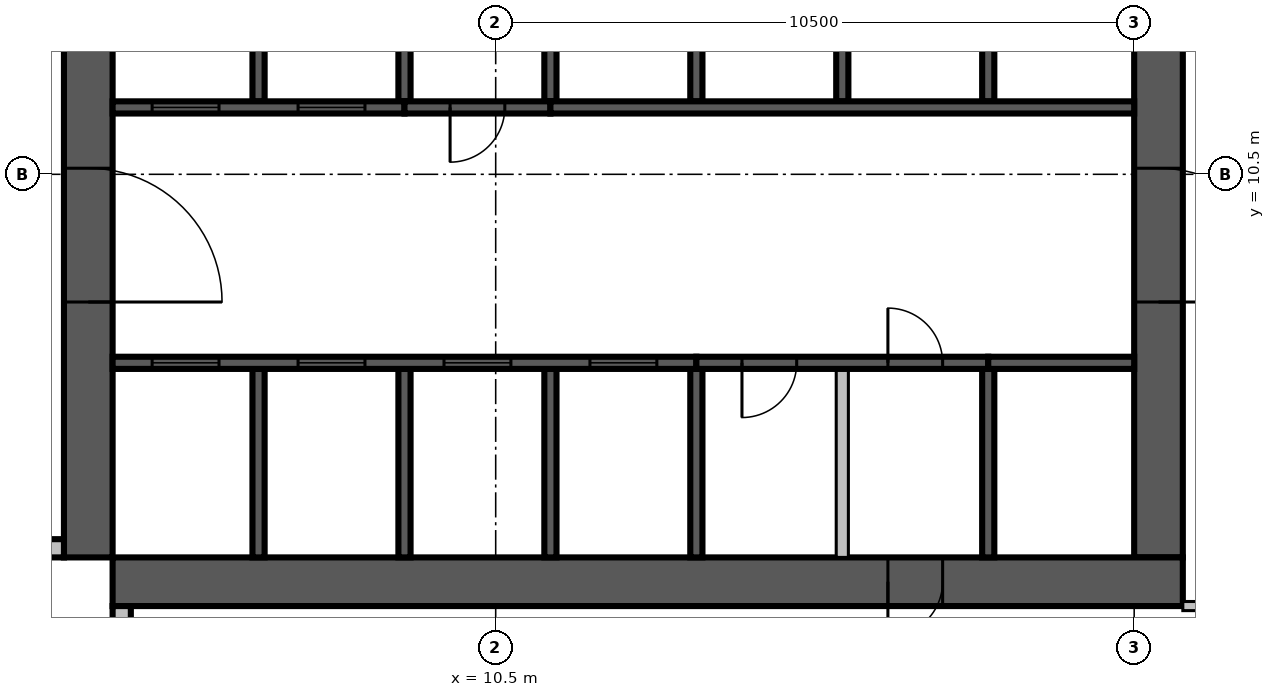
"""IFC4 building model, lengths in metres.
Left out: names, types, materials, properties, quantities, classifications, styles, units other than length and angle.
Written with IfcOpenShell. Run it as: python <this file> out.ifc"""

import sys

from ifc_helpers import new_model, si_unit, direction, frame, frame_2d, origin, place, context, subcontext, project, spatial, rectangle, extrude, source, transform, mapped, element, fill, save


model = new_model("IFC4")
c1 = context("Model", 3, precision=1e-05, world=origin(), true_north=direction((0.0, 1.0)))
c2 = subcontext(c1, "Body", "Model", "MODEL_VIEW")
j1 = project(units=[si_unit("LENGTHUNIT", "METRE"), si_unit("PLANEANGLEUNIT", "RADIAN")], contexts=[c1])
p1 = place(None, origin())
s1 = spatial("IfcSite", under=j1, at=p1, CompositionType="ELEMENT")
p2 = place(p1, origin())
s2 = spatial("IfcBuilding", under=s1, at=p2, CompositionType="ELEMENT")
p3 = place(p2, frame((0.0, 0.0, 193.0)))
s3 = spatial("IfcBuildingStorey", under=s2, at=p3, CompositionType="ELEMENT", Elevation=193.0)
m1 = source(origin(), c2, "Body", "SweptSolid", [
    extrude(rectangle(XDim=17.6, YDim=0.8, at=frame_2d((8.8, 0.0))), origin(), (0.0, 0.0, 1.0), 3.8),
])
p4 = place(p3, frame((3.8, 4.2, 0.0), z_axis=(0.0, 0.0, 1.0), x_axis=(0.0, 1.0, 0.0)))
e1 = element("IfcWall", 1, at=p4, inside=s3, PredefinedType="SHEAR", context=c2, shape_type="MappedRepresentation", body=[
    mapped(m1, transform((0.0, 0.0, 0.0), scale=1.0)),
])
m2 = source(origin(), c2, "Body", "SweptSolid", [
    extrude(rectangle(XDim=2.2, YDim=2.1, at=frame_2d((1.1, 1.05))), frame((0.0, 0.41, 0.0), z_axis=(0.0, -1.0, 0.0), x_axis=(1.0, 0.0, 0.0)), (0.0, 0.0, 1.0), 0.82),
])
p5 = place(p4, frame((4.2, 0.0, 0.0)))
e2 = element("IfcOpeningElement", 2, at=p5, cuts=e1, PredefinedType="OPENING", context=c2, shape_type="MappedRepresentation", body=[
    mapped(m2, transform((0.0, 0.0, 0.0), scale=1.0)),
])
m3 = source(origin(), c2, "Body", "SweptSolid", [
    extrude(rectangle(XDim=0.9, YDim=2.1, at=frame_2d((0.45, 1.05))), frame((0.0, 0.41, 0.0), z_axis=(0.0, -1.0, 0.0), x_axis=(1.0, 0.0, 0.0)), (0.0, 0.0, 1.0), 0.82),
])
p6 = place(p4, frame((10.95, 0.0, 0.0)))
e3 = element("IfcOpeningElement", 3, at=p6, cuts=e1, PredefinedType="OPENING", context=c2, shape_type="MappedRepresentation", body=[
    mapped(m3, transform((0.0, 0.0, 0.0), scale=1.0)),
])
m4 = source(origin(), c2, "Body", "SweptSolid", [
    extrude(rectangle(XDim=16.8, YDim=0.8, at=frame_2d((8.4, 0.0))), origin(), (0.0, 0.0, 1.0), 3.8),
])
p7 = place(p3, frame((21.4, 4.2, 0.0), z_axis=(0.0, 0.0, 1.0), x_axis=(0.0, 1.0, 0.0)))
e4 = element("IfcWall", 4, at=p7, inside=s3, PredefinedType="SHEAR", context=c2, shape_type="MappedRepresentation", body=[
    mapped(m4, transform((0.0, 0.0, 0.0), scale=1.0)),
])
p8 = place(p7, frame((4.2, 0.0, 0.0)))
e5 = element("IfcOpeningElement", 5, at=p8, cuts=e4, PredefinedType="OPENING", context=c2, shape_type="MappedRepresentation", body=[
    mapped(m2, transform((0.0, 0.0, 0.0), scale=1.0)),
])
m5 = source(origin(), c2, "Body", "SweptSolid", [
    extrude(rectangle(XDim=1.2, YDim=2.1, at=frame_2d((0.6, 1.05))), frame((0.0, 0.41, 0.0), z_axis=(0.0, -1.0, 0.0), x_axis=(1.0, 0.0, 0.0)), (0.0, 0.0, 1.0), 0.82),
])
p9 = place(p7, frame((14.7, 0.0, 0.0)))
e6 = element("IfcOpeningElement", 6, at=p9, cuts=e4, PredefinedType="OPENING", context=c2, shape_type="MappedRepresentation", body=[
    mapped(m5, transform((0.0, 0.0, 0.0), scale=1.0)),
])
p10 = place(p3, frame((4.2, 3.8, 0.0), z_axis=(0.0, 0.0, 1.0), x_axis=(1.0, 0.0, 0.0)))
e7 = element("IfcWall", 7, at=p10, inside=s3, PredefinedType="SHEAR", context=c2, shape_type="MappedRepresentation", body=[
    mapped(m1, transform((0.0, 0.0, 0.0), scale=1.0)),
])
p11 = place(p10, frame((12.75, 0.0, 0.0)))
e8 = element("IfcOpeningElement", 8, at=p11, cuts=e7, PredefinedType="OPENING", context=c2, shape_type="MappedRepresentation", body=[
    mapped(m3, transform((0.0, 0.0, 0.0), scale=1.0)),
])
m6 = source(origin(), c2, "Body", "SweptSolid", [
    extrude(rectangle(XDim=3.4, YDim=0.3, at=frame_2d((1.7, 0.0))), origin(), (0.0, 0.0, 1.0), 3.4),
])
p12 = place(p3, frame((0.0, 4.35, 0.0), z_axis=(0.0, 0.0, 1.0), x_axis=(1.0, 0.0, 0.0)))
e9 = element("IfcWall", 9, at=p12, inside=s3, PredefinedType="STANDARD", context=c2, shape_type="MappedRepresentation", body=[
    mapped(m6, transform((0.0, 0.0, 0.0), scale=1.0)),
])
m7 = source(origin(), c2, "Body", "SweptSolid", [
    extrude(rectangle(XDim=1.8, YDim=2.3, at=frame_2d((0.9, 1.15))), frame((0.0, 0.16, 0.0), z_axis=(0.0, -1.0, 0.0), x_axis=(1.0, 0.0, 0.0)), (0.0, 0.0, 1.0), 0.32),
])
p13 = place(p12, frame((1.2, 0.0, 0.6)))
e10 = element("IfcOpeningElement", 10, at=p13, cuts=e9, PredefinedType="OPENING", context=c2, shape_type="MappedRepresentation", body=[
    mapped(m7, transform((0.0, 0.0, 0.0), scale=1.0)),
])
p14 = place(p3, frame((4.35, 3.4, 0.0), z_axis=(0.0, 0.0, 1.0), x_axis=(0.0, -1.0, 0.0)))
e11 = element("IfcWall", 11, at=p14, inside=s3, PredefinedType="STANDARD", context=c2, shape_type="MappedRepresentation", body=[
    mapped(m6, transform((0.0, 0.0, 0.0), scale=1.0)),
])
p15 = place(p14, frame((0.4, 0.0, 0.6)))
e12 = element("IfcOpeningElement", 12, at=p15, cuts=e11, PredefinedType="OPENING", context=c2, shape_type="MappedRepresentation", body=[
    mapped(m7, transform((0.0, 0.0, 0.0), scale=1.0)),
])
m8 = source(origin(), c2, "Body", "SweptSolid", [
    extrude(rectangle(XDim=3.1, YDim=0.2, at=frame_2d((1.55, 0.0))), origin(), (0.0, 0.0, 1.0), 3.8),
])
for number, where, z_axis, x_axis in (
    (13, (6.6, 4.2, 0.0), (0.0, 0.0, 1.0), (0.0, 1.0, 0.0)),
    (14, (9.0, 4.2, 0.0), (0.0, 0.0, 1.0), (0.0, 1.0, 0.0)),
    (15, (11.4, 4.2, 0.0), (0.0, 0.0, 1.0), (0.0, 1.0, 0.0)),
):
    element("IfcWall", number, at=place(p3, frame(where, z_axis=z_axis, x_axis=x_axis)), inside=s3, PredefinedType="SOLIDWALL", context=c2, shape_type="MappedRepresentation", body=[
        mapped(m8, transform((0.0, 0.0, 0.0), scale=1.0)),
    ])
m9 = source(origin(), c2, "Body", "SweptSolid", [
    extrude(rectangle(XDim=3.1, YDim=0.2, at=frame_2d((1.55, 0.0))), origin(), (0.0, 0.0, 1.0), 3.4),
])
for number, where, z_axis, x_axis in (
    (16, (13.8, 4.2, 0.0), (0.0, 0.0, 1.0), (0.0, 1.0, 0.0)),
    (17, (18.6, 4.2, 0.0), (0.0, 0.0, 1.0), (0.0, 1.0, 0.0)),
):
    element("IfcWall", number, at=place(p3, frame(where, z_axis=z_axis, x_axis=x_axis)), inside=s3, PredefinedType="SOLIDWALL", context=c2, shape_type="MappedRepresentation", body=[
        mapped(m9, transform((0.0, 0.0, 0.0), scale=1.0)),
    ])
p16 = place(p3, frame((16.2, 4.2, 0.0), z_axis=(0.0, 0.0, 1.0), x_axis=(0.0, 1.0, 0.0)))
e18 = element("IfcWall", 18, at=p16, inside=s3, PredefinedType="PARTITIONING", context=c2, shape_type="SweptSolid", body=[
    extrude(rectangle(XDim=3.1, YDim=0.2, at=frame_2d((1.55, 0.0))), origin(), (0.0, 0.0, 1.0), 3.4),
])
m10 = source(origin(), c2, "Body", "SweptSolid", [
    extrude(rectangle(XDim=3.0, YDim=0.2, at=frame_2d((1.5, 0.0))), origin(), (0.0, 0.0, 1.0), 3.8),
])
p17 = place(p3, frame((6.6, 11.7, 0.0), z_axis=(0.0, 0.0, 1.0), x_axis=(0.0, 1.0, 0.0)))
e19 = element("IfcWall", 19, at=p17, inside=s3, PredefinedType="SOLIDWALL", context=c2, shape_type="MappedRepresentation", body=[
    mapped(m10, transform((0.0, 0.0, 0.0), scale=1.0)),
])
m11 = source(origin(), c2, "Body", "SweptSolid", [
    extrude(rectangle(XDim=3.0, YDim=0.2, at=frame_2d((1.5, 0.0))), origin(), (0.0, 0.0, 1.0), 3.4),
])
for number, where, z_axis, x_axis in (
    (20, (9.0, 11.7, 0.0), (0.0, 0.0, 1.0), (0.0, 1.0, 0.0)),
    (21, (11.4, 11.7, 0.0), (0.0, 0.0, 1.0), (0.0, 1.0, 0.0)),
):
    element("IfcWall", number, at=place(p3, frame(where, z_axis=z_axis, x_axis=x_axis)), inside=s3, PredefinedType="SOLIDWALL", context=c2, shape_type="MappedRepresentation", body=[
        mapped(m11, transform((0.0, 0.0, 0.0), scale=1.0)),
    ])
for number, where, z_axis, x_axis in (
    (22, (13.8, 11.7, 0.0), (0.0, 0.0, 1.0), (0.0, 1.0, 0.0)),
    (23, (16.2, 11.7, 0.0), (0.0, 0.0, 1.0), (0.0, 1.0, 0.0)),
    (24, (18.6, 11.7, 0.0), (0.0, 0.0, 1.0), (0.0, 1.0, 0.0)),
):
    element("IfcWall", number, at=place(p3, frame(where, z_axis=z_axis, x_axis=x_axis)), inside=s3, PredefinedType="SOLIDWALL", context=c2, shape_type="MappedRepresentation", body=[
        mapped(m10, transform((0.0, 0.0, 0.0), scale=1.0)),
    ])
m12 = source(origin(), c2, "Body", "SweptSolid", [
    extrude(rectangle(XDim=9.6, YDim=0.2, at=frame_2d((4.8, 0.0))), origin(), (0.0, 0.0, 1.0), 3.8),
])
p18 = place(p3, frame((4.2, 7.4, 0.0), z_axis=(0.0, 0.0, 1.0), x_axis=(1.0, 0.0, 0.0)))
e25 = element("IfcWall", 25, at=p18, inside=s3, PredefinedType="SOLIDWALL", context=c2, shape_type="MappedRepresentation", body=[
    mapped(m12, transform((0.0, 0.0, 0.0), scale=1.0)),
])
m13 = source(origin(), c2, "Body", "SweptSolid", [
    extrude(rectangle(XDim=1.1, YDim=2.1, at=frame_2d((0.55, 1.05))), frame((0.0, 0.11, 0.0), z_axis=(0.0, -1.0, 0.0), x_axis=(1.0, 0.0, 0.0)), (0.0, 0.0, 1.0), 0.22),
])
p19 = place(p18, frame((0.65, 0.0, 0.0)))
e26 = element("IfcOpeningElement", 26, at=p19, cuts=e25, PredefinedType="OPENING", context=c2, shape_type="MappedRepresentation", body=[
    mapped(m13, transform((0.0, 0.0, 0.0), scale=1.0)),
])
p20 = place(p18, frame((3.05, 0.0, 0.0)))
e27 = element("IfcOpeningElement", 27, at=p20, cuts=e25, PredefinedType="OPENING", context=c2, shape_type="MappedRepresentation", body=[
    mapped(m13, transform((0.0, 0.0, 0.0), scale=1.0)),
])
p21 = place(p18, frame((5.45, 0.0, 0.0)))
e28 = element("IfcOpeningElement", 28, at=p21, cuts=e25, PredefinedType="OPENING", context=c2, shape_type="MappedRepresentation", body=[
    mapped(m13, transform((0.0, 0.0, 0.0), scale=1.0)),
])
p22 = place(p18, frame((7.85, 0.0, 0.0)))
e29 = element("IfcOpeningElement", 29, at=p22, cuts=e25, PredefinedType="OPENING", context=c2, shape_type="MappedRepresentation", body=[
    mapped(m13, transform((0.0, 0.0, 0.0), scale=1.0)),
])
m14 = source(origin(), c2, "Body", "SweptSolid", [
    extrude(rectangle(XDim=4.8, YDim=0.2, at=frame_2d((2.4, 0.0))), origin(), (0.0, 0.0, 1.0), 3.4),
])
p23 = place(p3, frame((13.8, 7.4, 0.0), z_axis=(0.0, 0.0, 1.0), x_axis=(1.0, 0.0, 0.0)))
e30 = element("IfcWall", 30, at=p23, inside=s3, PredefinedType="SOLIDWALL", context=c2, shape_type="MappedRepresentation", body=[
    mapped(m14, transform((0.0, 0.0, 0.0), scale=1.0)),
])
m15 = source(origin(), c2, "Body", "SweptSolid", [
    extrude(rectangle(XDim=0.9, YDim=2.1, at=frame_2d((0.45, 1.05))), frame((0.0, 0.11, 0.0), z_axis=(0.0, -1.0, 0.0), x_axis=(1.0, 0.0, 0.0)), (0.0, 0.0, 1.0), 0.22),
])
p24 = place(p23, frame((0.75, 0.0, 0.0)))
e31 = element("IfcOpeningElement", 31, at=p24, cuts=e30, PredefinedType="OPENING", context=c2, shape_type="MappedRepresentation", body=[
    mapped(m15, transform((0.0, 0.0, 0.0), scale=1.0)),
])
p25 = place(p23, frame((3.15, 0.0, 0.0)))
e32 = element("IfcOpeningElement", 32, at=p25, cuts=e30, PredefinedType="OPENING", context=c2, shape_type="MappedRepresentation", body=[
    mapped(m15, transform((0.0, 0.0, 0.0), scale=1.0)),
])
m16 = source(origin(), c2, "Body", "SweptSolid", [
    extrude(rectangle(XDim=2.4, YDim=0.2, at=frame_2d((1.2, 0.0))), origin(), (0.0, 0.0, 1.0), 3.8),
])
p26 = place(p3, frame((18.6, 7.4, 0.0), z_axis=(0.0, 0.0, 1.0), x_axis=(1.0, 0.0, 0.0)))
e33 = element("IfcWall", 33, at=p26, inside=s3, PredefinedType="SOLIDWALL", context=c2, shape_type="MappedRepresentation", body=[
    mapped(m16, transform((0.0, 0.0, 0.0), scale=1.0)),
])
m17 = source(origin(), c2, "Body", "SweptSolid", [
    extrude(rectangle(XDim=4.8, YDim=0.2, at=frame_2d((2.4, 0.0))), origin(), (0.0, 0.0, 1.0), 3.8),
])
p27 = place(p3, frame((4.2, 11.6, 0.0), z_axis=(0.0, 0.0, 1.0), x_axis=(1.0, 0.0, 0.0)))
e34 = element("IfcWall", 34, at=p27, inside=s3, PredefinedType="SOLIDWALL", context=c2, shape_type="MappedRepresentation", body=[
    mapped(m17, transform((0.0, 0.0, 0.0), scale=1.0)),
])
p28 = place(p27, frame((0.65, 0.0, 0.0)))
e35 = element("IfcOpeningElement", 35, at=p28, cuts=e34, PredefinedType="OPENING", context=c2, shape_type="MappedRepresentation", body=[
    mapped(m13, transform((0.0, 0.0, 0.0), scale=1.0)),
])
p29 = place(p27, frame((3.05, 0.0, 0.0)))
e36 = element("IfcOpeningElement", 36, at=p29, cuts=e34, PredefinedType="OPENING", context=c2, shape_type="MappedRepresentation", body=[
    mapped(m13, transform((0.0, 0.0, 0.0), scale=1.0)),
])
m18 = source(origin(), c2, "Body", "SweptSolid", [
    extrude(rectangle(XDim=2.4, YDim=0.2, at=frame_2d((1.2, 0.0))), origin(), (0.0, 0.0, 1.0), 3.4),
])
p30 = place(p3, frame((9.0, 11.6, 0.0), z_axis=(0.0, 0.0, 1.0), x_axis=(1.0, 0.0, 0.0)))
e37 = element("IfcWall", 37, at=p30, inside=s3, PredefinedType="SOLIDWALL", context=c2, shape_type="MappedRepresentation", body=[
    mapped(m18, transform((0.0, 0.0, 0.0), scale=1.0)),
])
p31 = place(p30, frame((0.75, 0.0, 0.0)))
e38 = element("IfcOpeningElement", 38, at=p31, cuts=e37, PredefinedType="OPENING", context=c2, shape_type="MappedRepresentation", body=[
    mapped(m15, transform((0.0, 0.0, 0.0), scale=1.0)),
])
p32 = place(p3, frame((11.4, 11.6, 0.0), z_axis=(0.0, 0.0, 1.0), x_axis=(1.0, 0.0, 0.0)))
e39 = element("IfcWall", 39, at=p32, inside=s3, PredefinedType="SOLIDWALL", context=c2, shape_type="MappedRepresentation", body=[
    mapped(m12, transform((0.0, 0.0, 0.0), scale=1.0)),
])
m19 = source(origin(), c2, "Body", "SweptSolid", [
    extrude(rectangle(XDim=7.525, YDim=0.15, at=frame_2d((3.763, 0.0))), origin(), (0.0, 0.0, 1.0), 3.4),
])
p33 = place(p3, frame((21.8, 3.4, 0.0), z_axis=(0.0, 0.0, 1.0), x_axis=(1.0, 0.0, 0.0)))
e40 = element("IfcWall", 40, at=p33, inside=s3, PredefinedType="PARTITIONING", context=c2, shape_type="MappedRepresentation", body=[
    mapped(m19, transform((0.0, 0.0, 0.0), scale=1.0)),
])
m20 = source(origin(), c2, "Body", "SweptSolid", [
    extrude(rectangle(XDim=1.0, YDim=2.1, at=frame_2d((0.5, 1.05))), frame((0.0, 0.085, 0.0), z_axis=(0.0, -1.0, 0.0), x_axis=(1.0, 0.0, 0.0)), (0.0, 0.0, 1.0), 0.17),
])
p34 = place(p33, frame((3.3, 0.0, 0.0)))
e41 = element("IfcOpeningElement", 41, at=p34, cuts=e40, PredefinedType="OPENING", context=c2, shape_type="MappedRepresentation", body=[
    mapped(m20, transform((0.0, 0.0, 0.0), scale=1.0)),
])
m21 = source(origin(), c2, "Body", "SweptSolid", [
    extrude(rectangle(XDim=0.9, YDim=2.1, at=frame_2d((0.45, 1.05))), frame((0.0, 0.085, 0.0), z_axis=(0.0, -1.0, 0.0), x_axis=(1.0, 0.0, 0.0)), (0.0, 0.0, 1.0), 0.17),
])
p35 = place(p33, frame((2.312, 0.0, 0.0)))
e42 = element("IfcOpeningElement", 42, at=p35, cuts=e40, PredefinedType="OPENING", context=c2, shape_type="MappedRepresentation", body=[
    mapped(m21, transform((0.0, 0.0, 0.0), scale=1.0)),
])
m22 = source(origin(), c2, "Body", "SweptSolid", [
    extrude(rectangle(XDim=1.1, YDim=2.1, at=frame_2d((0.55, 1.05))), frame((0.0, 0.025, 0.0), z_axis=(0.0, -1.0, 0.0), x_axis=(1.0, 0.0, 0.0)), (0.0, 0.0, 1.0), 0.05),
])
p36 = place(p19, origin())
e43 = element("IfcDoor", 43, at=p36, inside=s3, OperationType="SLIDING_TO_LEFT", PredefinedType="DOOR", context=c2, shape_type="MappedRepresentation", body=[
    mapped(m22, transform((0.0, 0.0, 0.0), scale=1.0)),
])
fill(e26, e43)
p37 = place(p20, origin())
e44 = element("IfcDoor", 44, at=p37, inside=s3, OperationType="SLIDING_TO_LEFT", PredefinedType="DOOR", context=c2, shape_type="MappedRepresentation", body=[
    mapped(m22, transform((0.0, 0.0, 0.0), scale=1.0)),
])
fill(e27, e44)
p38 = place(p21, origin())
e45 = element("IfcDoor", 45, at=p38, inside=s3, OperationType="SLIDING_TO_LEFT", PredefinedType="DOOR", context=c2, shape_type="MappedRepresentation", body=[
    mapped(m22, transform((0.0, 0.0, 0.0), scale=1.0)),
])
fill(e28, e45)
p39 = place(p22, origin())
e46 = element("IfcDoor", 46, at=p39, inside=s3, OperationType="SLIDING_TO_LEFT", PredefinedType="DOOR", context=c2, shape_type="MappedRepresentation", body=[
    mapped(m22, transform((0.0, 0.0, 0.0), scale=1.0)),
])
fill(e29, e46)
m23 = source(origin(), c2, "Body", "SweptSolid", [
    extrude(rectangle(XDim=0.9, YDim=2.1, at=frame_2d((0.45, 1.05))), frame((0.0, 0.025, 0.0), z_axis=(0.0, -1.0, 0.0), x_axis=(1.0, 0.0, 0.0)), (0.0, 0.0, 1.0), 0.05),
])
p40 = place(p24, origin())
e47 = element("IfcDoor", 47, at=p40, inside=s3, OperationType="SINGLE_SWING_RIGHT", PredefinedType="DOOR", context=c2, shape_type="MappedRepresentation", body=[
    mapped(m23, transform((0.0, 0.0, 0.0), scale=1.0)),
])
fill(e31, e47)
p41 = place(p25, origin())
e48 = element("IfcDoor", 48, at=p41, inside=s3, OperationType="SINGLE_SWING_LEFT", PredefinedType="DOOR", context=c2, shape_type="MappedRepresentation", body=[
    mapped(m23, transform((0.0, 0.0, 0.0), scale=1.0)),
])
fill(e32, e48)
p42 = place(p28, origin())
e49 = element("IfcDoor", 49, at=p42, inside=s3, OperationType="SLIDING_TO_LEFT", PredefinedType="DOOR", context=c2, shape_type="MappedRepresentation", body=[
    mapped(m22, transform((0.0, 0.0, 0.0), scale=1.0)),
])
fill(e35, e49)
p43 = place(p29, origin())
e50 = element("IfcDoor", 50, at=p43, inside=s3, OperationType="SLIDING_TO_LEFT", PredefinedType="DOOR", context=c2, shape_type="MappedRepresentation", body=[
    mapped(m22, transform((0.0, 0.0, 0.0), scale=1.0)),
])
fill(e36, e50)
p44 = place(p31, origin())
e51 = element("IfcDoor", 51, at=p44, inside=s3, OperationType="SINGLE_SWING_RIGHT", PredefinedType="DOOR", context=c2, shape_type="MappedRepresentation", body=[
    mapped(m23, transform((0.0, 0.0, 0.0), scale=1.0)),
])
fill(e38, e51)
m24 = source(origin(), c2, "Body", "SweptSolid", [
    extrude(rectangle(XDim=2.2, YDim=2.1, at=frame_2d((1.1, 1.05))), frame((0.0, 0.025, 0.0), z_axis=(0.0, -1.0, 0.0), x_axis=(1.0, 0.0, 0.0)), (0.0, 0.0, 1.0), 0.05),
])
p45 = place(p8, origin())
e52 = element("IfcDoor", 52, at=p45, inside=s3, OperationType="DOUBLE_DOOR_SINGLE_SWING", PredefinedType="DOOR", context=c2, shape_type="MappedRepresentation", body=[
    mapped(m24, transform((0.0, 0.0, 0.0), scale=1.0)),
])
fill(e5, e52)
p46 = place(p5, origin())
e53 = element("IfcDoor", 53, at=p46, inside=s3, OperationType="DOUBLE_DOOR_SINGLE_SWING", PredefinedType="DOOR", context=c2, shape_type="MappedRepresentation", body=[
    mapped(m24, transform((0.0, 0.0, 0.0), scale=1.0)),
])
fill(e2, e53)
p47 = place(p11, origin())
e54 = element("IfcDoor", 54, at=p47, inside=s3, OperationType="SINGLE_SWING_RIGHT", PredefinedType="DOOR", context=c2, shape_type="MappedRepresentation", body=[
    mapped(m23, transform((0.0, 0.0, 0.0), scale=1.0)),
])
fill(e8, e54)
save(model, sys.argv[1])
